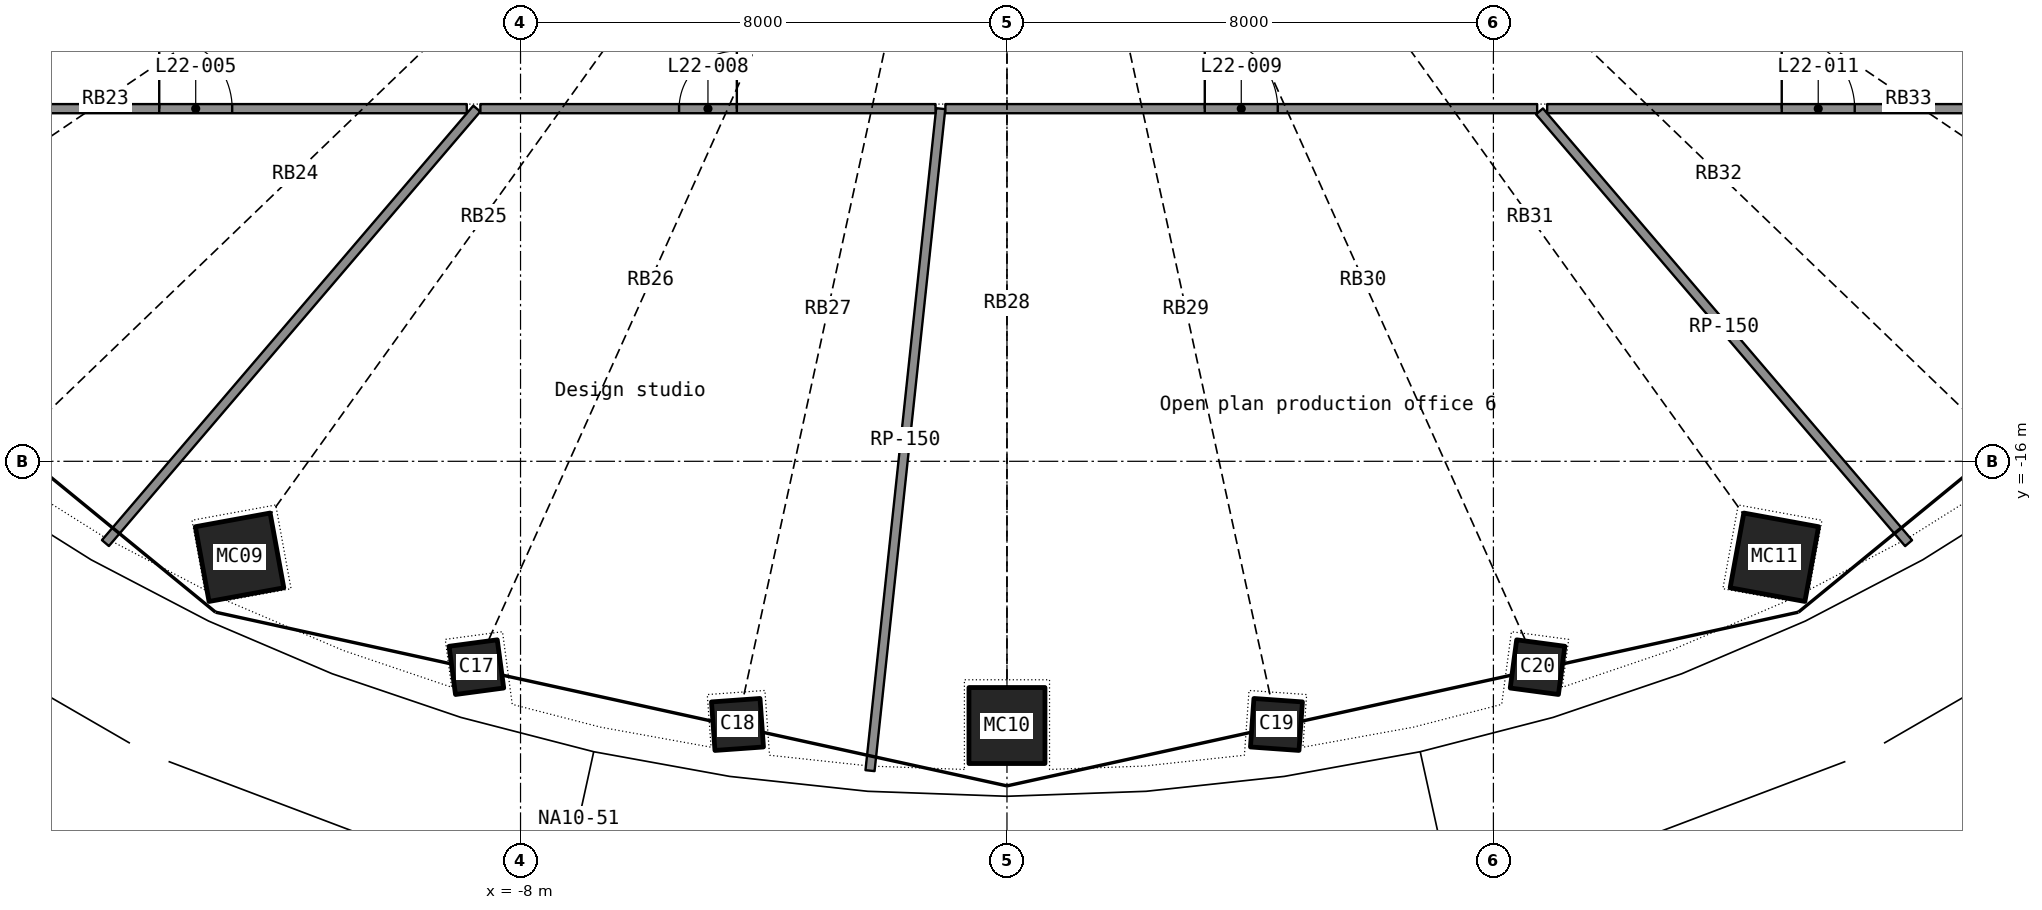
"""IFC4 building model, lengths in metres.
Left out: names, types, materials, properties, quantities, classifications, styles, units other than length and angle.
Written with IfcOpenShell. Run it as: python <this file> out.ifc"""

import sys

from ifc_helpers import new_model, si_unit, direction, frame, frame_2d, origin, origin_2d, place, context, subcontext, project, spatial, rectangle, hollow_rectangle, extrude, element, fill, save


model = new_model("IFC4")
c1 = context("Model", 3, precision=1e-05, world=origin(), true_north=direction((0.0, 1.0)))
c2 = subcontext(c1, "Body", "Model", "MODEL_VIEW")
j1 = project(units=[si_unit("LENGTHUNIT", "METRE"), si_unit("PLANEANGLEUNIT", "RADIAN")], contexts=[c1])
p1 = place(None, origin())
s1 = spatial("IfcSite", under=j1, at=p1, CompositionType="ELEMENT")
p2 = place(p1, origin())
s2 = spatial("IfcBuilding", under=s1, at=p2, CompositionType="ELEMENT")
p3 = place(p2, frame((0.0, 0.0, 97.1)))
s3 = spatial("IfcBuildingStorey", under=s2, at=p3, CompositionType="ELEMENT", Elevation=97.1)
p4 = place(p3, frame((-12.621, -17.578, 0.0), z_axis=(0.017346173, 0.024535271, 0.999548463), x_axis=(-0.907049274, 0.420989759, 0.005407177)))
e1 = element("IfcColumn", 1, at=p4, inside=s3, PredefinedType="COLUMN", context=c2, shape_type="SweptSolid", body=[
    extrude(hollow_rectangle(XDim=1.25, YDim=1.25, WallThickness=0.032, at=origin_2d()), origin(), (0.0, 0.0, 1.0), 3.702),
])
for number, where, z_axis, x_axis in (
    (2, (-8.726, -19.386, 0.0), (0.012, 0.027, 1.0), (-0.96, 0.28, 0.004)),
    (3, (-4.432, -20.328, 0.0), (0.006, 0.028, 1.0), (-0.99, 0.138, 0.002)),
):
    element("IfcColumn", number, at=place(p3, frame(where, z_axis=z_axis, x_axis=x_axis)), inside=s3, PredefinedType="COLUMN", context=c2, shape_type="SweptSolid", body=[
        extrude(hollow_rectangle(XDim=0.8, YDim=0.8, WallThickness=0.025, at=origin_2d()), origin(), (0.0, 0.0, 1.0), 3.701),
    ])
p5 = place(p3, frame((0.0, -20.346, 0.0), z_axis=(0.0, 0.02836206, 0.999597716), x_axis=(-1.0, 0.0, 0.0)))
e4 = element("IfcColumn", 4, at=p5, inside=s3, PredefinedType="COLUMN", context=c2, shape_type="SweptSolid", body=[
    extrude(hollow_rectangle(XDim=1.25, YDim=1.25, WallThickness=0.032, at=origin_2d()), origin(), (0.0, 0.0, 1.0), 3.701),
])
for number, where, z_axis, x_axis in (
    (5, (4.432, -20.328, 0.0), (-0.006, 0.028, 1.0), (-0.99, -0.138, -0.002)),
    (6, (8.726, -19.386, 0.0), (-0.012, 0.027, 1.0), (-0.96, -0.28, -0.004)),
):
    element("IfcColumn", number, at=place(p3, frame(where, z_axis=z_axis, x_axis=x_axis)), inside=s3, PredefinedType="COLUMN", context=c2, shape_type="SweptSolid", body=[
        extrude(hollow_rectangle(XDim=0.8, YDim=0.8, WallThickness=0.025, at=origin_2d()), origin(), (0.0, 0.0, 1.0), 3.701),
    ])
p6 = place(p3, frame((12.621, -17.578, 0.0), z_axis=(-0.017346173, 0.024535271, 0.999548463), x_axis=(-0.907049274, -0.420989759, -0.005407177)))
e7 = element("IfcColumn", 7, at=p6, inside=s3, PredefinedType="COLUMN", context=c2, shape_type="SweptSolid", body=[
    extrude(hollow_rectangle(XDim=1.25, YDim=1.25, WallThickness=0.032, at=origin_2d()), origin(), (0.0, 0.0, 1.0), 3.702),
])
p7 = place(p3, frame((-2.252, -21.088, 0.0), z_axis=(0.0, 0.0, 1.0), x_axis=(0.106196959, 0.994345114, 0.0)))
e8 = element("IfcWall", 8, at=p7, inside=s3, PredefinedType="PARTITIONING", context=c2, shape_type="SweptSolid", body=[
    extrude(rectangle(XDim=10.95, YDim=0.15, at=frame_2d((5.475, 0.0))), origin(), (0.0, 0.0, 1.0), 2.4),
])
p8 = place(p3, frame((-1.013, -10.2, 0.0), z_axis=(0.0, 0.0, 1.0), x_axis=(1.0, 0.0, 0.0)))
e9 = element("IfcWall", 9, at=p8, inside=s3, PredefinedType="PARTITIONING", context=c2, shape_type="SweptSolid", body=[
    extrude(rectangle(XDim=9.732, YDim=0.15, at=frame_2d((4.866, 0.0))), origin(), (0.0, 0.0, 1.0), 2.4),
])
p9 = place(p8, frame((4.266, 0.0, 0.0)))
e10 = element("IfcOpeningElement", 10, at=p9, cuts=e9, PredefinedType="OPENING", context=c2, shape_type="SweptSolid", body=[
    extrude(rectangle(XDim=1.2, YDim=2.2, at=frame_2d((0.6, 1.1))), frame((0.0, 0.085, 0.0), z_axis=(0.0, -1.0, 0.0), x_axis=(1.0, 0.0, 0.0)), (0.0, 0.0, 1.0), 0.17),
])
p10 = place(p3, frame((14.828, -17.346, 0.0), z_axis=(0.0, 0.0, 1.0), x_axis=(-0.649770677, 0.760130296, 0.0)))
e11 = element("IfcWall", 11, at=p10, inside=s3, PredefinedType="PARTITIONING", context=c2, shape_type="SweptSolid", body=[
    extrude(rectangle(XDim=9.342, YDim=0.15, at=frame_2d((4.671, 0.0))), origin(), (0.0, 0.0, 1.0), 2.4),
])
p11 = place(p3, frame((-14.827, -17.345, 0.0), z_axis=(0.0, 0.0, 1.0), x_axis=(0.649770499, 0.760130448, 0.0)))
e12 = element("IfcWall", 12, at=p11, inside=s3, PredefinedType="PARTITIONING", context=c2, shape_type="SweptSolid", body=[
    extrude(rectangle(XDim=9.4, YDim=0.15, at=frame_2d((4.7, 0.0))), origin(), (0.0, 0.0, 1.0), 2.4),
])
p12 = place(p3, frame((-17.8, -10.2, 0.0), z_axis=(0.0, 0.0, 1.0), x_axis=(1.0, 0.0, 0.0)))
e13 = element("IfcWall", 13, at=p12, inside=s3, PredefinedType="PARTITIONING", context=c2, shape_type="SweptSolid", body=[
    extrude(rectangle(XDim=8.916, YDim=0.15, at=frame_2d((4.458, 0.0))), origin(), (0.0, 0.0, 1.0), 2.4),
])
p13 = place(p12, frame((3.858, 0.0, 0.0)))
e14 = element("IfcOpeningElement", 14, at=p13, cuts=e13, PredefinedType="OPENING", context=c2, shape_type="SweptSolid", body=[
    extrude(rectangle(XDim=1.2, YDim=2.2, at=frame_2d((0.6, 1.1))), frame((0.0, 0.085, 0.0), z_axis=(0.0, -1.0, 0.0), x_axis=(1.0, 0.0, 0.0)), (0.0, 0.0, 1.0), 0.17),
])
p14 = place(p3, frame((8.884, -10.2, 0.0), z_axis=(0.0, 0.0, 1.0), x_axis=(1.0, 0.0, 0.0)))
e15 = element("IfcWall", 15, at=p14, inside=s3, PredefinedType="PARTITIONING", context=c2, shape_type="SweptSolid", body=[
    extrude(rectangle(XDim=8.916, YDim=0.15, at=frame_2d((4.458, 0.0))), origin(), (0.0, 0.0, 1.0), 2.4),
])
p15 = place(p14, frame((3.858, 0.0, 0.0)))
e16 = element("IfcOpeningElement", 16, at=p15, cuts=e15, PredefinedType="OPENING", context=c2, shape_type="SweptSolid", body=[
    extrude(rectangle(XDim=1.2, YDim=2.2, at=frame_2d((0.6, 1.1))), frame((0.0, 0.085, 0.0), z_axis=(0.0, -1.0, 0.0), x_axis=(1.0, 0.0, 0.0)), (0.0, 0.0, 1.0), 0.17),
])
p16 = place(p3, frame((-8.66, -10.2, 0.0), z_axis=(0.0, 0.0, 1.0), x_axis=(1.0, 0.0, 0.0)))
e17 = element("IfcWall", 17, at=p16, inside=s3, PredefinedType="PARTITIONING", context=c2, shape_type="SweptSolid", body=[
    extrude(rectangle(XDim=7.486, YDim=0.15, at=frame_2d((3.743, 0.0))), origin(), (0.0, 0.0, 1.0), 2.4),
])
p17 = place(p16, frame((3.268, 0.0, 0.0)))
e18 = element("IfcOpeningElement", 18, at=p17, cuts=e17, PredefinedType="OPENING", context=c2, shape_type="SweptSolid", body=[
    extrude(rectangle(XDim=0.95, YDim=2.15, at=frame_2d((0.475, 1.075))), frame((0.0, 0.085, 0.0), z_axis=(0.0, -1.0, 0.0), x_axis=(1.0, 0.0, 0.0)), (0.0, 0.0, 1.0), 0.17),
])
p18 = place(p13, origin())
e19 = element("IfcDoor", 19, at=p18, inside=s3, OperationType="DOUBLE_DOOR_SINGLE_SWING", PredefinedType="DOOR", context=c2, shape_type="SweptSolid", body=[
    extrude(rectangle(XDim=1.2, YDim=2.2, at=frame_2d((0.6, 1.1))), frame((0.0, 0.025, 0.0), z_axis=(0.0, -1.0, 0.0), x_axis=(1.0, 0.0, 0.0)), (0.0, 0.0, 1.0), 0.05),
])
fill(e14, e19)
p19 = place(p17, origin())
e20 = element("IfcDoor", 20, at=p19, inside=s3, OperationType="SINGLE_SWING_RIGHT", PredefinedType="DOOR", context=c2, shape_type="SweptSolid", body=[
    extrude(rectangle(XDim=0.95, YDim=2.15, at=frame_2d((0.475, 1.075))), frame((0.0, 0.025, 0.0), z_axis=(0.0, -1.0, 0.0), x_axis=(1.0, 0.0, 0.0)), (0.0, 0.0, 1.0), 0.05),
])
fill(e18, e20)
p20 = place(p9, origin())
e21 = element("IfcDoor", 21, at=p20, inside=s3, OperationType="DOUBLE_DOOR_SINGLE_SWING", PredefinedType="DOOR", context=c2, shape_type="SweptSolid", body=[
    extrude(rectangle(XDim=1.2, YDim=2.2, at=frame_2d((0.6, 1.1))), frame((0.0, 0.025, 0.0), z_axis=(0.0, -1.0, 0.0), x_axis=(1.0, 0.0, 0.0)), (0.0, 0.0, 1.0), 0.05),
])
fill(e10, e21)
p21 = place(p15, origin())
e22 = element("IfcDoor", 22, at=p21, inside=s3, OperationType="DOUBLE_DOOR_SINGLE_SWING", PredefinedType="DOOR", context=c2, shape_type="SweptSolid", body=[
    extrude(rectangle(XDim=1.2, YDim=2.2, at=frame_2d((0.6, 1.1))), frame((0.0, 0.025, 0.0), z_axis=(0.0, -1.0, 0.0), x_axis=(1.0, 0.0, 0.0)), (0.0, 0.0, 1.0), 0.05),
])
fill(e16, e22)
save(model, sys.argv[1])
